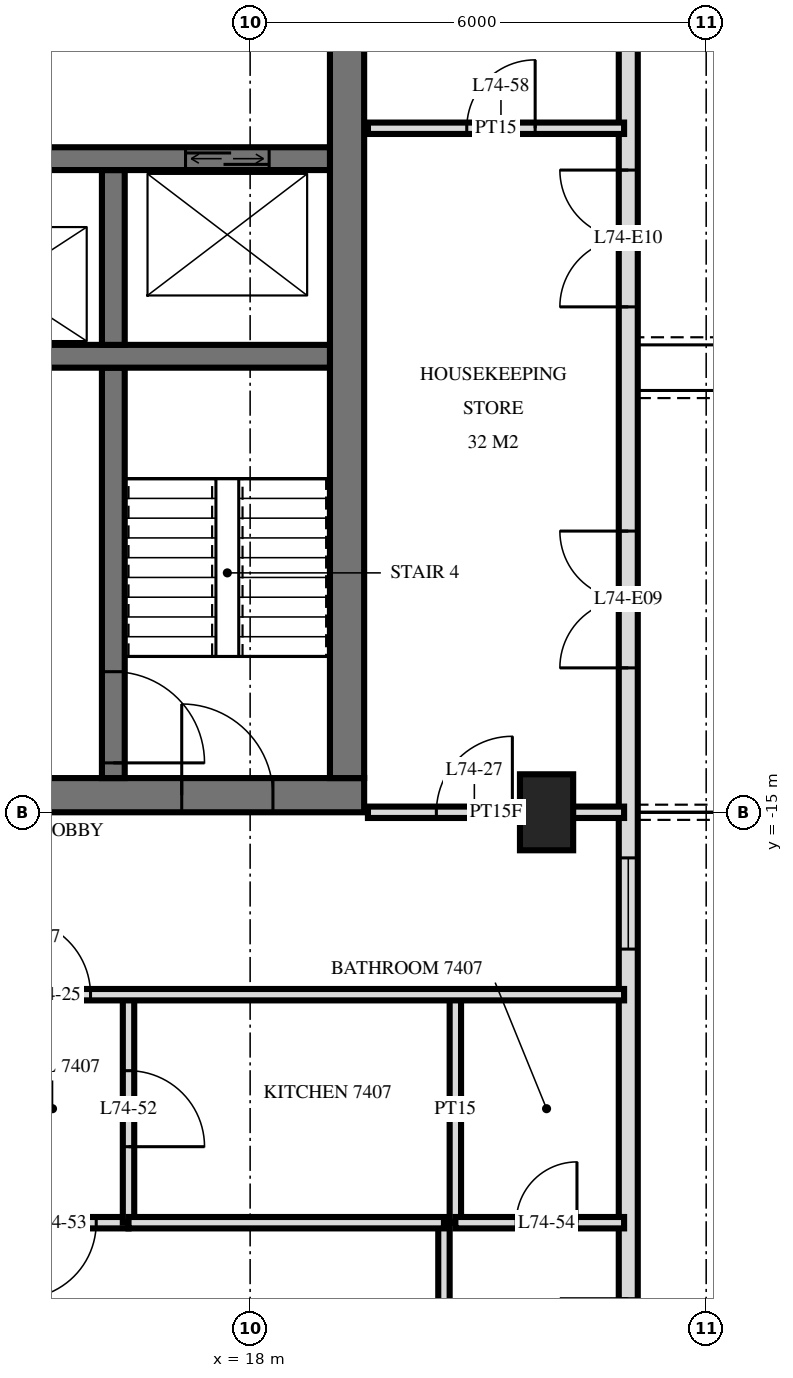
"""IFC4 building model, lengths in metres.
Left out: names, types, materials, properties, quantities, classifications, styles, units other than length and angle.
Written with IfcOpenShell. Run it as: python <this file> out.ifc"""

import sys

from ifc_helpers import new_model, si_unit, direction, frame, frame_2d, origin, origin_2d, place, context, subcontext, project, spatial, rectangle, extrude, element, fill, save


model = new_model("IFC4")
c1 = context("Model", 3, precision=1e-05, world=origin(), true_north=direction((0.0, 1.0)))
c2 = subcontext(c1, "Body", "Model", "MODEL_VIEW")
j1 = project(units=[si_unit("LENGTHUNIT", "METRE"), si_unit("PLANEANGLEUNIT", "RADIAN")], contexts=[c1])
p1 = place(None, origin())
s1 = spatial("IfcSite", under=j1, at=p1, CompositionType="ELEMENT")
p2 = place(p1, origin())
s2 = spatial("IfcBuilding", under=s1, at=p2, CompositionType="ELEMENT")
p3 = place(p2, frame((0.0, 0.0, 280.6)))
s3 = spatial("IfcBuildingStorey", under=s2, at=p3, CompositionType="ELEMENT", Elevation=280.6)
p4 = place(p3, frame((21.9, -15.0, 0.0), z_axis=(0.0, 0.0, 1.0), x_axis=(0.0, 1.0, 0.0)))
e1 = element("IfcColumn", 1, at=p4, inside=s3, PredefinedType="COLUMN", context=c2, shape_type="SweptSolid", body=[
    extrude(rectangle(XDim=1.0, YDim=0.7, at=origin_2d()), origin(), (0.0, 0.0, 1.0), 3.5),
])
p5 = place(p3, frame((10.0, -14.775, 0.0), z_axis=(0.0, 0.0, 1.0), x_axis=(1.0, 0.0, 0.0)))
e2 = element("IfcWall", 2, at=p5, inside=s3, PredefinedType="SHEAR", context=c2, shape_type="SweptSolid", body=[
    extrude(rectangle(XDim=9.5, YDim=0.45, at=frame_2d((4.75, 0.0))), origin(), (0.0, 0.0, 1.0), 3.5),
])
p6 = place(p5, frame((7.1, 0.0, 0.0)))
e3 = element("IfcOpeningElement", 3, at=p6, cuts=e2, PredefinedType="OPENING", context=c2, shape_type="SweptSolid", body=[
    extrude(rectangle(XDim=1.2, YDim=2.1, at=frame_2d((0.6, 1.05))), frame((0.0, 0.235, 0.0), z_axis=(0.0, -1.0, 0.0), x_axis=(1.0, 0.0, 0.0)), (0.0, 0.0, 1.0), 0.47),
])
p7 = place(p5, frame((4.15, 0.0, 0.0)))
e4 = element("IfcOpeningElement", 4, at=p7, cuts=e2, PredefinedType="OPENING", context=c2, shape_type="SweptSolid", body=[
    extrude(rectangle(XDim=1.1, YDim=2.1, at=frame_2d((0.55, 1.05))), frame((0.0, 0.235, 0.0), z_axis=(0.0, -1.0, 0.0), x_axis=(1.0, 0.0, 0.0)), (0.0, 0.0, 1.0), 0.47),
])
p8 = place(p3, frame((19.275, -14.55, 0.0), z_axis=(0.0, 0.0, 1.0), x_axis=(0.0, 1.0, 0.0)))
e5 = element("IfcWall", 5, at=p8, inside=s3, PredefinedType="SHEAR", context=c2, shape_type="SweptSolid", body=[
    extrude(rectangle(XDim=14.1, YDim=0.45, at=frame_2d((7.05, 0.0))), origin(), (0.0, 0.0, 1.0), 3.5),
])
p9 = place(p3, frame((10.35, -6.4, 0.0), z_axis=(0.0, 0.0, 1.0), x_axis=(1.0, 0.0, 0.0)))
e6 = element("IfcWall", 6, at=p9, inside=s3, PredefinedType="SHEAR", context=c2, shape_type="SweptSolid", body=[
    extrude(rectangle(XDim=8.7, YDim=0.3, at=frame_2d((4.35, 0.0))), origin(), (0.0, 0.0, 1.0), 3.5),
])
p10 = place(p9, frame((6.8, 0.0, 0.0)))
e7 = element("IfcOpeningElement", 7, at=p10, cuts=e6, PredefinedType="OPENING", context=c2, shape_type="SweptSolid", body=[
    extrude(rectangle(XDim=1.1, YDim=2.1, at=frame_2d((0.55, 1.05))), frame((0.0, 0.16, 0.0), z_axis=(0.0, -1.0, 0.0), x_axis=(1.0, 0.0, 0.0)), (0.0, 0.0, 1.0), 0.32),
])
p11 = place(p3, frame((10.35, -9.0, 0.0), z_axis=(0.0, 0.0, 1.0), x_axis=(1.0, 0.0, 0.0)))
e8 = element("IfcWall", 8, at=p11, inside=s3, PredefinedType="SHEAR", context=c2, shape_type="SweptSolid", body=[
    extrude(rectangle(XDim=8.7, YDim=0.3, at=frame_2d((4.35, 0.0))), origin(), (0.0, 0.0, 1.0), 3.5),
])
p12 = place(p11, frame((3.8, 0.0, 0.0)))
e9 = element("IfcOpeningElement", 9, at=p12, cuts=e8, PredefinedType="OPENING", context=c2, shape_type="SweptSolid", body=[
    extrude(rectangle(XDim=1.1, YDim=2.1, at=frame_2d((0.55, 1.05))), frame((0.0, 0.16, 0.0), z_axis=(0.0, -1.0, 0.0), x_axis=(1.0, 0.0, 0.0)), (0.0, 0.0, 1.0), 0.32),
])
p13 = place(p3, frame((16.2, -8.85, 0.0), z_axis=(0.0, 0.0, 1.0), x_axis=(0.0, 1.0, 0.0)))
e10 = element("IfcWall", 10, at=p13, inside=s3, PredefinedType="SHEAR", context=c2, shape_type="SweptSolid", body=[
    extrude(rectangle(XDim=2.3, YDim=0.3, at=frame_2d((1.15, 0.0))), origin(), (0.0, 0.0, 1.0), 3.5),
])
p14 = place(p3, frame((16.2, -14.55, 0.0), z_axis=(0.0, 0.0, 1.0), x_axis=(0.0, 1.0, 0.0)))
e11 = element("IfcWall", 11, at=p14, inside=s3, PredefinedType="SHEAR", context=c2, shape_type="SweptSolid", body=[
    extrude(rectangle(XDim=5.4, YDim=0.3, at=frame_2d((2.7, 0.0))), origin(), (0.0, 0.0, 1.0), 3.5),
])
p15 = place(p14, frame((0.2, 0.0, 0.0)))
e12 = element("IfcOpeningElement", 12, at=p15, cuts=e11, PredefinedType="OPENING", context=c2, shape_type="SweptSolid", body=[
    extrude(rectangle(XDim=1.2, YDim=2.1, at=frame_2d((0.6, 1.05))), frame((0.0, 0.16, 0.0), z_axis=(0.0, -1.0, 0.0), x_axis=(1.0, 0.0, 0.0)), (0.0, 0.0, 1.0), 0.32),
])
p16 = place(p3, frame((22.975, -29.275, 0.0), z_axis=(0.0, 0.0, 1.0), x_axis=(0.0, 1.0, 0.0)))
e13 = element("IfcWall", 13, at=p16, inside=s3, PredefinedType="SOLIDWALL", context=c2, shape_type="SweptSolid", body=[
    extrude(rectangle(XDim=25.951, YDim=0.25, at=frame_2d((12.975, 0.0))), origin(), (0.0, 0.0, 1.0), 3.22),
])
p17 = place(p16, frame((0.575, 0.0, 0.0)))
e14 = element("IfcOpeningElement", 14, at=p17, cuts=e13, PredefinedType="OPENING", context=c2, shape_type="SweptSolid", body=[
    extrude(rectangle(XDim=1.8, YDim=2.4, at=frame_2d((0.9, 1.2))), frame((0.0, 0.135, 0.0), z_axis=(0.0, -1.0, 0.0), x_axis=(1.0, 0.0, 0.0)), (0.0, 0.0, 1.0), 0.27),
])
p18 = place(p16, frame((3.325, 0.0, 0.9)))
e15 = element("IfcOpeningElement", 15, at=p18, cuts=e13, PredefinedType="OPENING", context=c2, shape_type="SweptSolid", body=[
    extrude(rectangle(XDim=1.8, YDim=1.5, at=frame_2d((0.9, 0.75))), frame((0.0, 0.135, 0.0), z_axis=(0.0, -1.0, 0.0), x_axis=(1.0, 0.0, 0.0)), (0.0, 0.0, 1.0), 0.27),
])
p19 = place(p16, frame((6.075, 0.0, 0.0)))
e16 = element("IfcOpeningElement", 16, at=p19, cuts=e13, PredefinedType="OPENING", context=c2, shape_type="SweptSolid", body=[
    extrude(rectangle(XDim=1.8, YDim=2.4, at=frame_2d((0.9, 1.2))), frame((0.0, 0.135, 0.0), z_axis=(0.0, -1.0, 0.0), x_axis=(1.0, 0.0, 0.0)), (0.0, 0.0, 1.0), 0.27),
])
p20 = place(p16, frame((12.475, 0.0, 0.9)))
e17 = element("IfcOpeningElement", 17, at=p20, cuts=e13, PredefinedType="OPENING", context=c2, shape_type="SweptSolid", body=[
    extrude(rectangle(XDim=1.2, YDim=1.5, at=frame_2d((0.6, 0.75))), frame((0.0, 0.135, 0.0), z_axis=(0.0, -1.0, 0.0), x_axis=(1.0, 0.0, 0.0)), (0.0, 0.0, 1.0), 0.27),
])
p21 = place(p16, frame((16.175, 0.0, 0.0)))
e18 = element("IfcOpeningElement", 18, at=p21, cuts=e13, PredefinedType="OPENING", context=c2, shape_type="SweptSolid", body=[
    extrude(rectangle(XDim=1.8, YDim=2.4, at=frame_2d((0.9, 1.2))), frame((0.0, 0.135, 0.0), z_axis=(0.0, -1.0, 0.0), x_axis=(1.0, 0.0, 0.0)), (0.0, 0.0, 1.0), 0.27),
])
p22 = place(p16, frame((20.925, 0.0, 0.0)))
e19 = element("IfcOpeningElement", 19, at=p22, cuts=e13, PredefinedType="OPENING", context=c2, shape_type="SweptSolid", body=[
    extrude(rectangle(XDim=1.8, YDim=2.4, at=frame_2d((0.9, 1.2))), frame((0.0, 0.135, 0.0), z_axis=(0.0, -1.0, 0.0), x_axis=(1.0, 0.0, 0.0)), (0.0, 0.0, 1.0), 0.27),
])
p23 = place(p3, frame((20.7, -20.4, 0.0), z_axis=(0.0, 0.0, 1.0), x_axis=(0.0, 1.0, 0.0)))
e20 = element("IfcWall", 20, at=p23, inside=s3, PredefinedType="PARTITIONING", context=c2, shape_type="SweptSolid", body=[
    extrude(rectangle(XDim=3.0, YDim=0.15, at=frame_2d((1.5, 0.0))), origin(), (0.0, 0.0, 1.0), 3.22),
])
p24 = place(p3, frame((20.55, -33.017, 0.0), z_axis=(0.0, 0.0, 1.0), x_axis=(0.0, 1.0, 0.0)))
e21 = element("IfcWall", 21, at=p24, inside=s3, PredefinedType="PARTITIONING", context=c2, shape_type="SweptSolid", body=[
    extrude(rectangle(XDim=12.617, YDim=0.15, at=frame_2d((6.308, 0.0))), origin(), (0.0, 0.0, 1.0), 3.22),
])
p25 = place(p24, frame((5.697, 0.0, 0.0)))
e22 = element("IfcOpeningElement", 22, at=p25, cuts=e21, PredefinedType="OPENING", context=c2, shape_type="SweptSolid", body=[
    extrude(rectangle(XDim=0.9, YDim=2.1, at=frame_2d((0.45, 1.05))), frame((0.0, 0.085, 0.0), z_axis=(0.0, -1.0, 0.0), x_axis=(1.0, 0.0, 0.0)), (0.0, 0.0, 1.0), 0.17),
])
p26 = place(p3, frame((16.4, -20.4, 0.0), z_axis=(0.0, 0.0, 1.0), x_axis=(0.0, 1.0, 0.0)))
e23 = element("IfcWall", 23, at=p26, inside=s3, PredefinedType="PARTITIONING", context=c2, shape_type="SweptSolid", body=[
    extrude(rectangle(XDim=3.0, YDim=0.15, at=frame_2d((1.5, 0.0))), origin(), (0.0, 0.0, 1.0), 3.22),
])
p27 = place(p26, frame((1.0, 0.0, 0.0)))
e24 = element("IfcOpeningElement", 24, at=p27, cuts=e23, PredefinedType="OPENING", context=c2, shape_type="SweptSolid", body=[
    extrude(rectangle(XDim=1.0, YDim=2.1, at=frame_2d((0.5, 1.05))), frame((0.0, 0.085, 0.0), z_axis=(0.0, -1.0, 0.0), x_axis=(1.0, 0.0, 0.0)), (0.0, 0.0, 1.0), 0.17),
])
p28 = place(p3, frame((14.55, -20.4, 0.0), z_axis=(0.0, 0.0, 1.0), x_axis=(1.0, 0.0, 0.0)))
e25 = element("IfcWall", 25, at=p28, inside=s3, PredefinedType="PARTITIONING", context=c2, shape_type="SweptSolid", body=[
    extrude(rectangle(XDim=1.85, YDim=0.15, at=frame_2d((0.925, 0.0))), origin(), (0.0, 0.0, 1.0), 3.22),
])
p29 = place(p28, frame((0.425, 0.0, 0.0)))
e26 = element("IfcOpeningElement", 26, at=p29, cuts=e25, PredefinedType="OPENING", context=c2, shape_type="SweptSolid", body=[
    extrude(rectangle(XDim=1.0, YDim=2.1, at=frame_2d((0.5, 1.05))), frame((0.0, 0.085, 0.0), z_axis=(0.0, -1.0, 0.0), x_axis=(1.0, 0.0, 0.0)), (0.0, 0.0, 1.0), 0.17),
])
p30 = place(p3, frame((16.4, -20.4, 0.0), z_axis=(0.0, 0.0, 1.0), x_axis=(1.0, 0.0, 0.0)))
e27 = element("IfcWall", 27, at=p30, inside=s3, PredefinedType="PARTITIONING", context=c2, shape_type="SweptSolid", body=[
    extrude(rectangle(XDim=4.15, YDim=0.15, at=frame_2d((2.075, 0.0))), origin(), (0.0, 0.0, 1.0), 3.22),
])
p31 = place(p3, frame((20.7, -20.4, 0.0), z_axis=(0.0, 0.0, 1.0), x_axis=(1.0, 0.0, 0.0)))
e28 = element("IfcWall", 28, at=p31, inside=s3, PredefinedType="PARTITIONING", context=c2, shape_type="SweptSolid", body=[
    extrude(rectangle(XDim=2.22, YDim=0.15, at=frame_2d((1.11, 0.0))), origin(), (0.0, 0.0, 1.0), 3.22),
])
p32 = place(p31, frame((0.8, 0.0, 0.0)))
e29 = element("IfcOpeningElement", 29, at=p32, cuts=e28, PredefinedType="OPENING", context=c2, shape_type="SweptSolid", body=[
    extrude(rectangle(XDim=0.8, YDim=2.1, at=frame_2d((0.4, 1.05))), frame((0.0, 0.085, 0.0), z_axis=(0.0, -1.0, 0.0), x_axis=(1.0, 0.0, 0.0)), (0.0, 0.0, 1.0), 0.17),
])
p33 = place(p3, frame((-22.92, -17.4, 0.0), z_axis=(0.0, 0.0, 1.0), x_axis=(1.0, 0.0, 0.0)))
e30 = element("IfcWall", 30, at=p33, inside=s3, PredefinedType="PARTITIONING", context=c2, shape_type="SweptSolid", body=[
    extrude(rectangle(XDim=45.84, YDim=0.15, at=frame_2d((22.92, 0.0))), origin(), (0.0, 0.0, 1.0), 3.22),
])
p34 = place(p33, frame((21.67, 0.0, 0.0)))
e31 = element("IfcOpeningElement", 31, at=p34, cuts=e30, PredefinedType="OPENING", context=c2, shape_type="SweptSolid", body=[
    extrude(rectangle(XDim=1.0, YDim=2.1, at=frame_2d((0.5, 1.05))), frame((0.0, 0.085, 0.0), z_axis=(0.0, -1.0, 0.0), x_axis=(1.0, 0.0, 0.0)), (0.0, 0.0, 1.0), 0.17),
])
p35 = place(p33, frame((24.77, 0.0, 0.0)))
e32 = element("IfcOpeningElement", 32, at=p35, cuts=e30, PredefinedType="OPENING", context=c2, shape_type="SweptSolid", body=[
    extrude(rectangle(XDim=1.0, YDim=2.1, at=frame_2d((0.5, 1.05))), frame((0.0, 0.085, 0.0), z_axis=(0.0, -1.0, 0.0), x_axis=(1.0, 0.0, 0.0)), (0.0, 0.0, 1.0), 0.17),
])
p36 = place(p33, frame((26.07, 0.0, 0.0)))
e33 = element("IfcOpeningElement", 33, at=p36, cuts=e30, PredefinedType="OPENING", context=c2, shape_type="SweptSolid", body=[
    extrude(rectangle(XDim=1.0, YDim=2.1, at=frame_2d((0.5, 1.05))), frame((0.0, 0.085, 0.0), z_axis=(0.0, -1.0, 0.0), x_axis=(1.0, 0.0, 0.0)), (0.0, 0.0, 1.0), 0.17),
])
p37 = place(p33, frame((30.77, 0.0, 0.0)))
e34 = element("IfcOpeningElement", 34, at=p37, cuts=e30, PredefinedType="OPENING", context=c2, shape_type="SweptSolid", body=[
    extrude(rectangle(XDim=1.0, YDim=2.1, at=frame_2d((0.5, 1.05))), frame((0.0, 0.085, 0.0), z_axis=(0.0, -1.0, 0.0), x_axis=(1.0, 0.0, 0.0)), (0.0, 0.0, 1.0), 0.17),
])
p38 = place(p33, frame((32.07, 0.0, 0.0)))
e35 = element("IfcOpeningElement", 35, at=p38, cuts=e30, PredefinedType="OPENING", context=c2, shape_type="SweptSolid", body=[
    extrude(rectangle(XDim=1.0, YDim=2.1, at=frame_2d((0.5, 1.05))), frame((0.0, 0.085, 0.0), z_axis=(0.0, -1.0, 0.0), x_axis=(1.0, 0.0, 0.0)), (0.0, 0.0, 1.0), 0.17),
])
p39 = place(p33, frame((9.42, 0.0, 0.0)))
e36 = element("IfcOpeningElement", 36, at=p39, cuts=e30, PredefinedType="OPENING", context=c2, shape_type="SweptSolid", body=[
    extrude(rectangle(XDim=1.0, YDim=2.1, at=frame_2d((0.5, 1.05))), frame((0.0, 0.085, 0.0), z_axis=(0.0, -1.0, 0.0), x_axis=(1.0, 0.0, 0.0)), (0.0, 0.0, 1.0), 0.17),
])
p40 = place(p33, frame((2.67, 0.0, 0.0)))
e37 = element("IfcOpeningElement", 37, at=p40, cuts=e30, PredefinedType="OPENING", context=c2, shape_type="SweptSolid", body=[
    extrude(rectangle(XDim=1.0, YDim=2.1, at=frame_2d((0.5, 1.05))), frame((0.0, 0.085, 0.0), z_axis=(0.0, -1.0, 0.0), x_axis=(1.0, 0.0, 0.0)), (0.0, 0.0, 1.0), 0.17),
])
p41 = place(p33, frame((37.82, 0.0, 0.0)))
e38 = element("IfcOpeningElement", 38, at=p41, cuts=e30, PredefinedType="OPENING", context=c2, shape_type="SweptSolid", body=[
    extrude(rectangle(XDim=1.0, YDim=2.1, at=frame_2d((0.5, 1.05))), frame((0.0, 0.085, 0.0), z_axis=(0.0, -1.0, 0.0), x_axis=(1.0, 0.0, 0.0)), (0.0, 0.0, 1.0), 0.17),
])
p42 = place(p3, frame((19.55, -15.0, 0.0), z_axis=(0.0, 0.0, 1.0), x_axis=(1.0, 0.0, 0.0)))
e39 = element("IfcWall", 39, at=p42, inside=s3, PredefinedType="PARTITIONING", context=c2, shape_type="SweptSolid", body=[
    extrude(rectangle(XDim=3.37, YDim=0.15, at=frame_2d((1.685, 0.0))), origin(), (0.0, 0.0, 1.0), 3.22),
])
p43 = place(p42, frame((0.9, 0.0, 0.0)))
e40 = element("IfcOpeningElement", 40, at=p43, cuts=e39, PredefinedType="OPENING", context=c2, shape_type="SweptSolid", body=[
    extrude(rectangle(XDim=1.0, YDim=2.1, at=frame_2d((0.5, 1.05))), frame((0.0, 0.085, 0.0), z_axis=(0.0, -1.0, 0.0), x_axis=(1.0, 0.0, 0.0)), (0.0, 0.0, 1.0), 0.17),
])
p44 = place(p3, frame((19.55, -6.0, 0.0), z_axis=(0.0, 0.0, 1.0), x_axis=(1.0, 0.0, 0.0)))
e41 = element("IfcWall", 41, at=p44, inside=s3, PredefinedType="PARTITIONING", context=c2, shape_type="SweptSolid", body=[
    extrude(rectangle(XDim=3.37, YDim=0.15, at=frame_2d((1.685, 0.0))), origin(), (0.0, 0.0, 1.0), 3.22),
])
p45 = place(p44, frame((1.3, 0.0, 0.0)))
e42 = element("IfcOpeningElement", 42, at=p45, cuts=e41, PredefinedType="OPENING", context=c2, shape_type="SweptSolid", body=[
    extrude(rectangle(XDim=0.9, YDim=2.1, at=frame_2d((0.45, 1.05))), frame((0.0, 0.085, 0.0), z_axis=(0.0, -1.0, 0.0), x_axis=(1.0, 0.0, 0.0)), (0.0, 0.0, 1.0), 0.17),
])
p46 = place(p20, origin())
e43 = element("IfcWindow", 43, at=p46, inside=s3, PartitioningType="SINGLE_PANEL", PredefinedType="WINDOW", context=c2, shape_type="SweptSolid", body=[
    extrude(rectangle(XDim=1.2, YDim=1.5, at=frame_2d((0.6, 0.75))), frame((0.0, 0.03, 0.0), z_axis=(0.0, -1.0, 0.0), x_axis=(1.0, 0.0, 0.0)), (0.0, 0.0, 1.0), 0.06),
])
fill(e17, e43)
p47 = place(p21, origin())
e44 = element("IfcDoor", 44, at=p47, inside=s3, OperationType="DOUBLE_DOOR_SINGLE_SWING", PredefinedType="DOOR", context=c2, shape_type="SweptSolid", body=[
    extrude(rectangle(XDim=1.8, YDim=2.4, at=frame_2d((0.9, 1.2))), frame((0.0, 0.025, 0.0), z_axis=(0.0, -1.0, 0.0), x_axis=(1.0, 0.0, 0.0)), (0.0, 0.0, 1.0), 0.05),
])
fill(e18, e44)
p48 = place(p22, origin())
e45 = element("IfcDoor", 45, at=p48, inside=s3, OperationType="DOUBLE_DOOR_SINGLE_SWING", PredefinedType="DOOR", context=c2, shape_type="SweptSolid", body=[
    extrude(rectangle(XDim=1.8, YDim=2.4, at=frame_2d((0.9, 1.2))), frame((0.0, 0.025, 0.0), z_axis=(0.0, -1.0, 0.0), x_axis=(1.0, 0.0, 0.0)), (0.0, 0.0, 1.0), 0.05),
])
fill(e19, e45)
p49 = place(p10, origin())
e46 = element("IfcDoor", 46, at=p49, inside=s3, OperationType="DOUBLE_DOOR_SLIDING", PredefinedType="USERDEFINED", context=c2, shape_type="SweptSolid", body=[
    extrude(rectangle(XDim=1.1, YDim=2.1, at=frame_2d((0.55, 1.05))), frame((0.0, 0.025, 0.0), z_axis=(0.0, -1.0, 0.0), x_axis=(1.0, 0.0, 0.0)), (0.0, 0.0, 1.0), 0.05),
])
fill(e7, e46)
p50 = place(p6, origin())
e47 = element("IfcDoor", 47, at=p50, inside=s3, OperationType="SINGLE_SWING_RIGHT", PredefinedType="DOOR", context=c2, shape_type="SweptSolid", body=[
    extrude(rectangle(XDim=1.2, YDim=2.1, at=frame_2d((0.6, 1.05))), frame((0.0, 0.025, 0.0), z_axis=(0.0, -1.0, 0.0), x_axis=(1.0, 0.0, 0.0)), (0.0, 0.0, 1.0), 0.05),
])
fill(e3, e47)
p51 = place(p15, frame((0.6, 0.0, 0.0), z_axis=(0.0, 0.0, 1.0), x_axis=(-1.0, 0.0, 0.0)))
e48 = element("IfcDoor", 48, at=p51, inside=s3, OperationType="SINGLE_SWING_LEFT", PredefinedType="DOOR", context=c2, shape_type="SweptSolid", body=[
    extrude(rectangle(XDim=1.2, YDim=2.1, at=frame_2d((0.0, 1.05))), frame((0.0, -0.025, 0.0), z_axis=(0.0, 1.0, 0.0), x_axis=(-1.0, 0.0, 0.0)), (0.0, 0.0, 1.0), 0.05),
])
fill(e12, e48)
p52 = place(p41, origin())
e49 = element("IfcDoor", 49, at=p52, inside=s3, OperationType="SINGLE_SWING_RIGHT", PredefinedType="DOOR", context=c2, shape_type="SweptSolid", body=[
    extrude(rectangle(XDim=1.0, YDim=2.1, at=frame_2d((0.5, 1.05))), frame((0.0, 0.025, 0.0), z_axis=(0.0, -1.0, 0.0), x_axis=(1.0, 0.0, 0.0)), (0.0, 0.0, 1.0), 0.05),
])
fill(e38, e49)
p53 = place(p43, origin())
e50 = element("IfcDoor", 50, at=p53, inside=s3, OperationType="SINGLE_SWING_LEFT", PredefinedType="DOOR", context=c2, shape_type="SweptSolid", body=[
    extrude(rectangle(XDim=1.0, YDim=2.1, at=frame_2d((0.5, 1.05))), frame((0.0, 0.025, 0.0), z_axis=(0.0, -1.0, 0.0), x_axis=(1.0, 0.0, 0.0)), (0.0, 0.0, 1.0), 0.05),
])
fill(e40, e50)
p54 = place(p27, frame((0.5, 0.0, 0.0), z_axis=(0.0, 0.0, 1.0), x_axis=(-1.0, 0.0, 0.0)))
e51 = element("IfcDoor", 51, at=p54, inside=s3, OperationType="SINGLE_SWING_LEFT", PredefinedType="DOOR", context=c2, shape_type="SweptSolid", body=[
    extrude(rectangle(XDim=1.0, YDim=2.1, at=frame_2d((0.0, 1.05))), frame((0.0, -0.025, 0.0), z_axis=(0.0, 1.0, 0.0), x_axis=(-1.0, 0.0, 0.0)), (0.0, 0.0, 1.0), 0.05),
])
fill(e24, e51)
p55 = place(p29, frame((0.5, 0.0, 0.0), z_axis=(0.0, 0.0, 1.0), x_axis=(-1.0, 0.0, 0.0)))
e52 = element("IfcDoor", 52, at=p55, inside=s3, OperationType="SINGLE_SWING_LEFT", PredefinedType="DOOR", context=c2, shape_type="SweptSolid", body=[
    extrude(rectangle(XDim=1.0, YDim=2.1, at=frame_2d((0.0, 1.05))), frame((0.0, -0.025, 0.0), z_axis=(0.0, 1.0, 0.0), x_axis=(-1.0, 0.0, 0.0)), (0.0, 0.0, 1.0), 0.05),
])
fill(e26, e52)
p56 = place(p32, origin())
e53 = element("IfcDoor", 53, at=p56, inside=s3, OperationType="SINGLE_SWING_LEFT", PredefinedType="DOOR", context=c2, shape_type="SweptSolid", body=[
    extrude(rectangle(XDim=0.8, YDim=2.1, at=frame_2d((0.4, 1.05))), frame((0.0, 0.025, 0.0), z_axis=(0.0, -1.0, 0.0), x_axis=(1.0, 0.0, 0.0)), (0.0, 0.0, 1.0), 0.05),
])
fill(e29, e53)
p57 = place(p45, origin())
e54 = element("IfcDoor", 54, at=p57, inside=s3, OperationType="SINGLE_SWING_LEFT", PredefinedType="DOOR", context=c2, shape_type="SweptSolid", body=[
    extrude(rectangle(XDim=0.9, YDim=2.1, at=frame_2d((0.45, 1.05))), frame((0.0, 0.025, 0.0), z_axis=(0.0, -1.0, 0.0), x_axis=(1.0, 0.0, 0.0)), (0.0, 0.0, 1.0), 0.05),
])
fill(e42, e54)
save(model, sys.argv[1])
